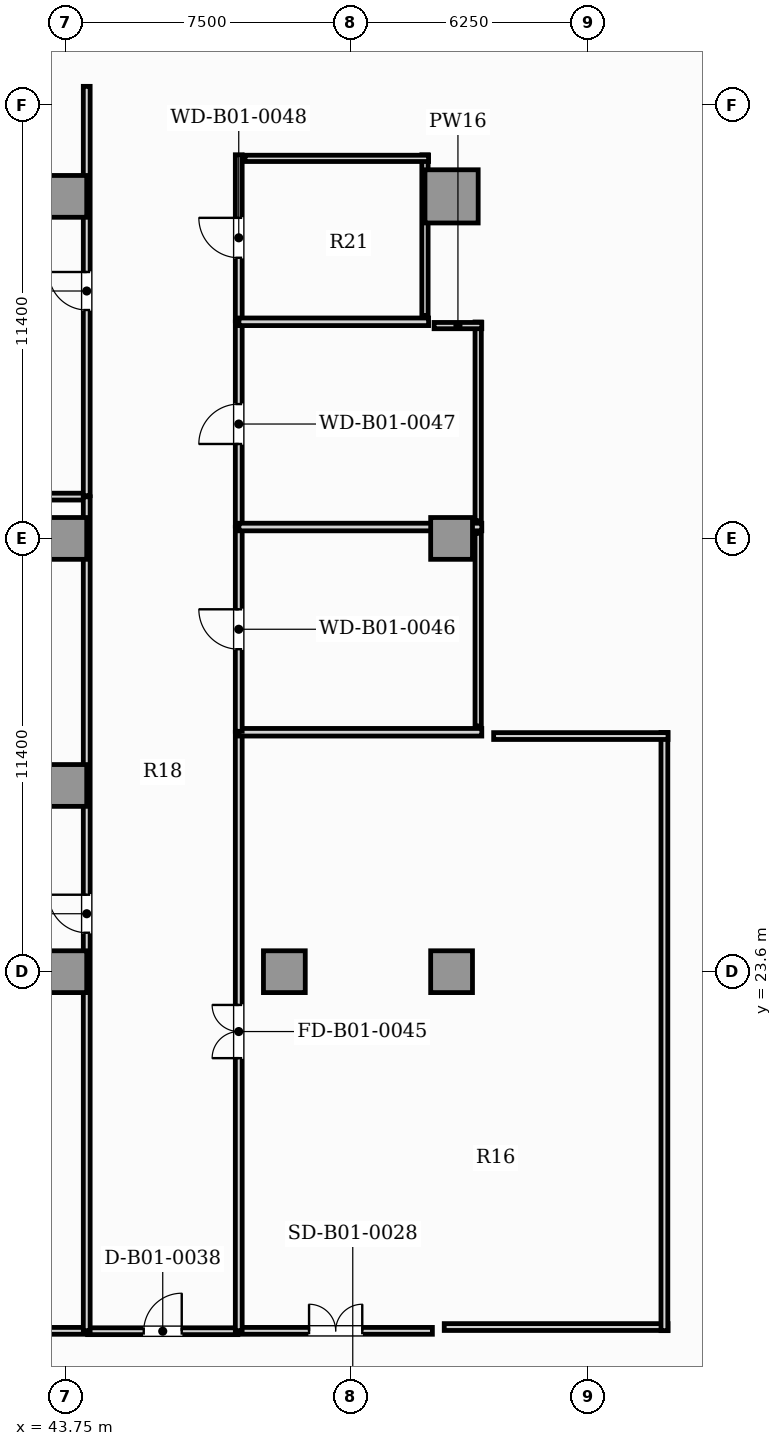
"""IFC4 building model, lengths in metres.
Left out: names, types, materials, properties, quantities, classifications, styles, units other than length and angle.
Written with IfcOpenShell. Run it as: python <this file> out.ifc"""

import sys

from ifc_helpers import new_model, si_unit, direction, frame, frame_2d, origin, origin_2d, place, context, subcontext, project, spatial, rectangle, hollow_rectangle, extrude, element, fill, save


model = new_model("IFC4")
c1 = context("Model", 3, precision=1e-05, world=origin(), true_north=direction((0.0, 1.0)))
c2 = subcontext(c1, "Body", "Model", "MODEL_VIEW")
j1 = project(units=[si_unit("LENGTHUNIT", "METRE"), si_unit("PLANEANGLEUNIT", "RADIAN")], contexts=[c1])
p1 = place(None, origin())
s1 = spatial("IfcSite", under=j1, at=p1, CompositionType="ELEMENT")
p2 = place(p1, origin())
s2 = spatial("IfcBuilding", under=s1, at=p2, CompositionType="ELEMENT")
p3 = place(p2, frame((0.0, 0.0, -5.4)))
s3 = spatial("IfcBuildingStorey", under=s2, at=p3, CompositionType="ELEMENT", Elevation=-5.4)
p4 = place(p3, frame((53.9, 44.0, 0.0), z_axis=(0.0, 0.0, 1.0), x_axis=(1.0, 0.0, 0.0)))
e1 = element("IfcColumn", 1, at=p4, inside=s3, PredefinedType="USERDEFINED", context=c2, shape_type="SweptSolid", body=[
    extrude(hollow_rectangle(XDim=1.4, YDim=1.4, WallThickness=0.08, at=origin_2d()), origin(), (0.0, 0.0, 1.0), 5.4),
])
for number, where, z_axis, x_axis in (
    (2, (43.75, 23.6, 0.0), (0.0, 0.0, 1.0), (1.0, 0.0, 0.0)),
    (3, (43.75, 35.0, 0.0), (0.0, 0.0, 1.0), (1.0, 0.0, 0.0)),
    (4, (43.75, 44.0, 0.0), (0.0, 0.0, 1.0), (1.0, 0.0, 0.0)),
    (5, (53.9, 23.6, 0.0), (0.0, 0.0, 1.0), (1.0, 0.0, 0.0)),
    (6, (53.9, 35.0, 0.0), (0.0, 0.0, 1.0), (1.0, 0.0, 0.0)),
    (7, (49.5, 23.6, 0.0), (0.0, 0.0, 1.0), (1.0, 0.0, 0.0)),
    (8, (43.75, 28.5, 0.0), (0.0, 0.0, 1.0), (1.0, 0.0, 0.0)),
):
    element("IfcColumn", number, at=place(p3, frame(where, z_axis=z_axis, x_axis=x_axis)), inside=s3, PredefinedType="COLUMN", context=c2, shape_type="SweptSolid", body=[
        extrude(rectangle(XDim=1.1, YDim=1.1, at=origin_2d()), origin(), (0.0, 0.0, 1.0), 5.4),
    ])
p5 = place(p3, frame((13.205, 14.15, 0.0), z_axis=(0.0, 0.0, 1.0), x_axis=(1.0, 0.0, 0.0)))
e9 = element("IfcWall", 9, at=p5, inside=s3, PredefinedType="PARTITIONING", context=c2, shape_type="SweptSolid", body=[
    extrude(rectangle(XDim=31.09, YDim=0.18, at=frame_2d((15.545, 0.0))), origin(), (0.0, 0.0, 1.0), 5.05),
])
p6 = place(p5, frame((15.045, 0.0, 0.0)))
e10 = element("IfcOpeningElement", 10, at=p6, cuts=e9, PredefinedType="OPENING", context=c2, shape_type="SweptSolid", body=[
    extrude(rectangle(XDim=1.0, YDim=2.15, at=frame_2d((0.5, 1.075))), frame((0.0, 0.1, 0.0), z_axis=(0.0, -1.0, 0.0), x_axis=(1.0, 0.0, 0.0)), (0.0, 0.0, 1.0), 0.2),
])
p7 = place(p3, frame((48.305, 14.15, 0.0), z_axis=(0.0, 0.0, 1.0), x_axis=(1.0, 0.0, 0.0)))
e11 = element("IfcWall", 11, at=p7, inside=s3, PredefinedType="PARTITIONING", context=c2, shape_type="SweptSolid", body=[
    extrude(rectangle(XDim=5.09, YDim=0.18, at=frame_2d((2.545, 0.0))), origin(), (0.0, 0.0, 1.0), 5.05),
])
p8 = place(p7, frame((1.845, 0.0, 0.0)))
e12 = element("IfcOpeningElement", 12, at=p8, cuts=e11, PredefinedType="OPENING", context=c2, shape_type="SweptSolid", body=[
    extrude(rectangle(XDim=1.4, YDim=2.2, at=frame_2d((0.7, 1.1))), frame((0.0, 0.1, 0.0), z_axis=(0.0, -1.0, 0.0), x_axis=(1.0, 0.0, 0.0)), (0.0, 0.0, 1.0), 0.2),
])
p9 = place(p3, frame((44.323, 14.14, 0.0), z_axis=(0.0, 0.0, 1.0), x_axis=(1.0, 0.0, 0.0)))
e13 = element("IfcWall", 13, at=p9, inside=s3, PredefinedType="PARTITIONING", context=c2, shape_type="SweptSolid", body=[
    extrude(rectangle(XDim=3.954, YDim=0.18, at=frame_2d((1.977, 0.0))), origin(), (0.0, 0.0, 1.0), 5.05),
])
p10 = place(p9, frame((1.477, 0.0, 0.0)))
e14 = element("IfcOpeningElement", 14, at=p10, cuts=e13, PredefinedType="OPENING", context=c2, shape_type="SweptSolid", body=[
    extrude(rectangle(XDim=1.0, YDim=2.15, at=frame_2d((0.5, 1.075))), frame((0.0, 0.1, 0.0), z_axis=(0.0, -1.0, 0.0), x_axis=(1.0, 0.0, 0.0)), (0.0, 0.0, 1.0), 0.2),
])
p11 = place(p3, frame((13.205, 36.1, 0.0), z_axis=(0.0, 0.0, 1.0), x_axis=(1.0, 0.0, 0.0)))
e15 = element("IfcWall", 15, at=p11, inside=s3, PredefinedType="PARTITIONING", context=c2, shape_type="SweptSolid", body=[
    extrude(rectangle(XDim=31.09, YDim=0.18, at=frame_2d((15.545, 0.0))), origin(), (0.0, 0.0, 1.0), 5.05),
])
p12 = place(p11, frame((10.382, 0.0, 0.0)))
e16 = element("IfcOpeningElement", 16, at=p12, cuts=e15, PredefinedType="OPENING", context=c2, shape_type="SweptSolid", body=[
    extrude(rectangle(XDim=1.0, YDim=2.15, at=frame_2d((0.5, 1.075))), frame((0.0, 0.1, 0.0), z_axis=(0.0, -1.0, 0.0), x_axis=(1.0, 0.0, 0.0)), (0.0, 0.0, 1.0), 0.2),
])
p13 = place(p3, frame((44.3, 14.155, 0.0), z_axis=(0.0, 0.0, 1.0), x_axis=(0.0, 1.0, 0.0)))
e17 = element("IfcWall", 17, at=p13, inside=s3, PredefinedType="PARTITIONING", context=c2, shape_type="SweptSolid", body=[
    extrude(rectangle(XDim=21.94, YDim=0.18, at=frame_2d((10.97, 0.0))), origin(), (0.0, 0.0, 1.0), 5.05),
])
p14 = place(p13, frame((10.47, 0.0, 0.0)))
e18 = element("IfcOpeningElement", 18, at=p14, cuts=e17, PredefinedType="OPENING", context=c2, shape_type="SweptSolid", body=[
    extrude(rectangle(XDim=1.0, YDim=2.15, at=frame_2d((0.5, 1.075))), frame((0.0, 0.1, 0.0), z_axis=(0.0, -1.0, 0.0), x_axis=(1.0, 0.0, 0.0)), (0.0, 0.0, 1.0), 0.2),
])
p15 = place(p3, frame((44.3, 36.125, 0.0), z_axis=(0.0, 0.0, 1.0), x_axis=(0.0, 1.0, 0.0)))
e19 = element("IfcWall", 19, at=p15, inside=s3, PredefinedType="PARTITIONING", context=c2, shape_type="SweptSolid", body=[
    extrude(rectangle(XDim=10.77, YDim=0.18, at=frame_2d((5.385, 0.0))), origin(), (0.0, 0.0, 1.0), 5.05),
])
p16 = place(p15, frame((4.885, 0.0, 0.0)))
e20 = element("IfcOpeningElement", 20, at=p16, cuts=e19, PredefinedType="OPENING", context=c2, shape_type="SweptSolid", body=[
    extrude(rectangle(XDim=1.0, YDim=2.15, at=frame_2d((0.5, 1.075))), frame((0.0, 0.1, 0.0), z_axis=(0.0, -1.0, 0.0), x_axis=(1.0, 0.0, 0.0)), (0.0, 0.0, 1.0), 0.2),
])
p17 = place(p3, frame((48.3, 14.155, 0.0), z_axis=(0.0, 0.0, 1.0), x_axis=(0.0, 1.0, 0.0)))
e21 = element("IfcWall", 21, at=p17, inside=s3, PredefinedType="PARTITIONING", context=c2, shape_type="SweptSolid", body=[
    extrude(rectangle(XDim=15.74, YDim=0.18, at=frame_2d((7.87, 0.0))), origin(), (0.0, 0.0, 1.0), 5.05),
])
p18 = place(p17, frame((7.17, 0.0, 0.0)))
e22 = element("IfcOpeningElement", 22, at=p18, cuts=e21, PredefinedType="OPENING", context=c2, shape_type="SweptSolid", body=[
    extrude(rectangle(XDim=1.4, YDim=2.2, at=frame_2d((0.7, 1.1))), frame((0.0, 0.1, 0.0), z_axis=(0.0, -1.0, 0.0), x_axis=(1.0, 0.0, 0.0)), (0.0, 0.0, 1.0), 0.2),
])
p19 = place(p3, frame((48.305, 29.9, 0.0), z_axis=(0.0, 0.0, 1.0), x_axis=(1.0, 0.0, 0.0)))
e23 = element("IfcWall", 23, at=p19, inside=s3, PredefinedType="PARTITIONING", context=c2, shape_type="SweptSolid", body=[
    extrude(rectangle(XDim=6.39, YDim=0.2, at=frame_2d((3.195, 0.0))), origin(), (0.0, 0.0, 1.0), 5.05),
])
p20 = place(p3, frame((48.3, 29.925, 0.0), z_axis=(0.0, 0.0, 1.0), x_axis=(0.0, 1.0, 0.0)))
e24 = element("IfcWall", 24, at=p20, inside=s3, PredefinedType="PARTITIONING", context=c2, shape_type="SweptSolid", body=[
    extrude(rectangle(XDim=5.37, YDim=0.18, at=frame_2d((2.685, 0.0))), origin(), (0.0, 0.0, 1.0), 5.05),
])
p21 = place(p20, frame((2.16, 0.0, 0.0)))
e25 = element("IfcOpeningElement", 25, at=p21, cuts=e24, PredefinedType="OPENING", context=c2, shape_type="SweptSolid", body=[
    extrude(rectangle(XDim=1.05, YDim=2.15, at=frame_2d((0.525, 1.075))), frame((0.0, 0.1, 0.0), z_axis=(0.0, -1.0, 0.0), x_axis=(1.0, 0.0, 0.0)), (0.0, 0.0, 1.0), 0.2),
])
p22 = place(p3, frame((48.3, 35.325, 0.0), z_axis=(0.0, 0.0, 1.0), x_axis=(0.0, 1.0, 0.0)))
e26 = element("IfcWall", 26, at=p22, inside=s3, PredefinedType="PARTITIONING", context=c2, shape_type="SweptSolid", body=[
    extrude(rectangle(XDim=5.37, YDim=0.18, at=frame_2d((2.685, 0.0))), origin(), (0.0, 0.0, 1.0), 5.05),
])
p23 = place(p22, frame((2.16, 0.0, 0.0)))
e27 = element("IfcOpeningElement", 27, at=p23, cuts=e26, PredefinedType="OPENING", context=c2, shape_type="SweptSolid", body=[
    extrude(rectangle(XDim=1.05, YDim=2.15, at=frame_2d((0.525, 1.075))), frame((0.0, 0.1, 0.0), z_axis=(0.0, -1.0, 0.0), x_axis=(1.0, 0.0, 0.0)), (0.0, 0.0, 1.0), 0.2),
])
p24 = place(p3, frame((48.3, 40.725, 0.0), z_axis=(0.0, 0.0, 1.0), x_axis=(0.0, 1.0, 0.0)))
e28 = element("IfcWall", 28, at=p24, inside=s3, PredefinedType="PARTITIONING", context=c2, shape_type="SweptSolid", body=[
    extrude(rectangle(XDim=4.37, YDim=0.18, at=frame_2d((2.185, 0.0))), origin(), (0.0, 0.0, 1.0), 5.05),
])
p25 = place(p24, frame((1.66, 0.0, 0.0)))
e29 = element("IfcOpeningElement", 29, at=p25, cuts=e28, PredefinedType="OPENING", context=c2, shape_type="SweptSolid", body=[
    extrude(rectangle(XDim=1.05, YDim=2.15, at=frame_2d((0.525, 1.075))), frame((0.0, 0.1, 0.0), z_axis=(0.0, -1.0, 0.0), x_axis=(1.0, 0.0, 0.0)), (0.0, 0.0, 1.0), 0.2),
])
p26 = place(p3, frame((48.305, 35.3, 0.0), z_axis=(0.0, 0.0, 1.0), x_axis=(1.0, 0.0, 0.0)))
e30 = element("IfcWall", 30, at=p26, inside=s3, PredefinedType="PARTITIONING", context=c2, shape_type="SweptSolid", body=[
    extrude(rectangle(XDim=6.39, YDim=0.2, at=frame_2d((3.195, 0.0))), origin(), (0.0, 0.0, 1.0), 4.15),
])
p27 = place(p3, frame((48.305, 40.7, 0.0), z_axis=(0.0, 0.0, 1.0), x_axis=(1.0, 0.0, 0.0)))
e31 = element("IfcWall", 31, at=p27, inside=s3, PredefinedType="PARTITIONING", context=c2, shape_type="SweptSolid", body=[
    extrude(rectangle(XDim=4.99, YDim=0.2, at=frame_2d((2.495, 0.0))), origin(), (0.0, 0.0, 1.0), 5.05),
])
p28 = place(p3, frame((53.708, 14.25, 0.0), z_axis=(0.0, 0.0, 1.0), x_axis=(1.0, 0.0, 0.0)))
e32 = element("IfcWall", 32, at=p28, inside=s3, PredefinedType="PARTITIONING", context=c2, shape_type="SweptSolid", body=[
    extrude(rectangle(XDim=5.887, YDim=0.18, at=frame_2d((2.944, 0.0))), origin(), (0.0, 0.0, 1.0), 5.05),
])
p29 = place(p3, frame((59.5, 14.155, 0.0), z_axis=(0.0, 0.0, 1.0), x_axis=(0.0, 1.0, 0.0)))
e33 = element("IfcWall", 33, at=p29, inside=s3, PredefinedType="PARTITIONING", context=c2, shape_type="SweptSolid", body=[
    extrude(rectangle(XDim=15.74, YDim=0.18, at=frame_2d((7.87, 0.0))), origin(), (0.0, 0.0, 1.0), 5.05),
])
p30 = place(p3, frame((59.595, 29.8, 0.0), z_axis=(0.0, 0.0, 1.0), x_axis=(-1.0, 0.0, 0.0)))
e34 = element("IfcWall", 34, at=p30, inside=s3, PredefinedType="PARTITIONING", context=c2, shape_type="SweptSolid", body=[
    extrude(rectangle(XDim=4.588, YDim=0.18, at=frame_2d((2.294, 0.0))), origin(), (0.0, 0.0, 1.0), 5.05),
])
p31 = place(p3, frame((54.6, 30.065, 0.0), z_axis=(0.0, 0.0, 1.0), x_axis=(0.0, 1.0, 0.0)))
e35 = element("IfcWall", 35, at=p31, inside=s3, PredefinedType="PLUMBINGWALL", context=c2, shape_type="SweptSolid", body=[
    extrude(rectangle(XDim=5.07, YDim=0.165, at=frame_2d((2.535, 0.0))), origin(), (0.0, 0.0, 1.0), 5.05),
])
p32 = place(p3, frame((54.6, 35.465, 0.0), z_axis=(0.0, 0.0, 1.0), x_axis=(0.0, 1.0, 0.0)))
e36 = element("IfcWall", 36, at=p32, inside=s3, PredefinedType="PLUMBINGWALL", context=c2, shape_type="SweptSolid", body=[
    extrude(rectangle(XDim=5.23, YDim=0.165, at=frame_2d((2.615, 0.0))), origin(), (0.0, 0.0, 1.0), 5.05),
])
p33 = place(p3, frame((54.695, 40.6, 0.0), z_axis=(0.0, 0.0, 1.0), x_axis=(-1.0, 0.0, 0.0)))
e37 = element("IfcWall", 37, at=p33, inside=s3, PredefinedType="PLUMBINGWALL", context=c2, shape_type="SweptSolid", body=[
    extrude(rectangle(XDim=1.255, YDim=0.165, at=frame_2d((0.627, 0.0))), origin(), (0.0, 0.0, 1.0), 5.05),
])
p34 = place(p3, frame((53.2, 40.865, 0.0), z_axis=(0.0, 0.0, 1.0), x_axis=(0.0, 1.0, 0.0)))
e38 = element("IfcWall", 38, at=p34, inside=s3, PredefinedType="PLUMBINGWALL", context=c2, shape_type="SweptSolid", body=[
    extrude(rectangle(XDim=4.23, YDim=0.165, at=frame_2d((2.115, 0.0))), origin(), (0.0, 0.0, 1.0), 5.05),
])
p35 = place(p3, frame((53.295, 45.0, 0.0), z_axis=(0.0, 0.0, 1.0), x_axis=(-1.0, 0.0, 0.0)))
e39 = element("IfcWall", 39, at=p35, inside=s3, PredefinedType="PLUMBINGWALL", context=c2, shape_type="SweptSolid", body=[
    extrude(rectangle(XDim=4.83, YDim=0.165, at=frame_2d((2.415, 0.0))), origin(), (0.0, 0.0, 1.0), 5.05),
])
p36 = place(p8, origin())
e40 = element("IfcDoor", 40, at=p36, inside=s3, OperationType="DOUBLE_DOOR_SINGLE_SWING", PredefinedType="DOOR", context=c2, shape_type="SweptSolid", body=[
    extrude(rectangle(XDim=1.4, YDim=2.2, at=frame_2d((0.7, 1.1))), frame((0.0, 0.025, 0.0), z_axis=(0.0, -1.0, 0.0), x_axis=(1.0, 0.0, 0.0)), (0.0, 0.0, 1.0), 0.05),
])
fill(e12, e40)
p37 = place(p10, origin())
e41 = element("IfcDoor", 41, at=p37, inside=s3, OperationType="SINGLE_SWING_RIGHT", PredefinedType="DOOR", context=c2, shape_type="SweptSolid", body=[
    extrude(rectangle(XDim=1.0, YDim=2.15, at=frame_2d((0.5, 1.075))), frame((0.0, 0.025, 0.0), z_axis=(0.0, -1.0, 0.0), x_axis=(1.0, 0.0, 0.0)), (0.0, 0.0, 1.0), 0.05),
])
fill(e14, e41)
p38 = place(p14, origin())
e42 = element("IfcDoor", 42, at=p38, inside=s3, OperationType="SINGLE_SWING_RIGHT", PredefinedType="DOOR", context=c2, shape_type="SweptSolid", body=[
    extrude(rectangle(XDim=1.0, YDim=2.15, at=frame_2d((0.5, 1.075))), frame((0.0, 0.025, 0.0), z_axis=(0.0, -1.0, 0.0), x_axis=(1.0, 0.0, 0.0)), (0.0, 0.0, 1.0), 0.05),
])
fill(e18, e42)
p39 = place(p16, origin())
e43 = element("IfcDoor", 43, at=p39, inside=s3, OperationType="SINGLE_SWING_RIGHT", PredefinedType="DOOR", context=c2, shape_type="SweptSolid", body=[
    extrude(rectangle(XDim=1.0, YDim=2.15, at=frame_2d((0.5, 1.075))), frame((0.0, 0.025, 0.0), z_axis=(0.0, -1.0, 0.0), x_axis=(1.0, 0.0, 0.0)), (0.0, 0.0, 1.0), 0.05),
])
fill(e20, e43)
p40 = place(p18, origin())
e44 = element("IfcDoor", 44, at=p40, inside=s3, OperationType="DOUBLE_DOOR_SINGLE_SWING", PredefinedType="DOOR", context=c2, shape_type="SweptSolid", body=[
    extrude(rectangle(XDim=1.4, YDim=2.2, at=frame_2d((0.7, 1.1))), frame((0.0, 0.025, 0.0), z_axis=(0.0, -1.0, 0.0), x_axis=(1.0, 0.0, 0.0)), (0.0, 0.0, 1.0), 0.05),
])
fill(e22, e44)
p41 = place(p21, origin())
e45 = element("IfcDoor", 45, at=p41, inside=s3, OperationType="SINGLE_SWING_RIGHT", PredefinedType="DOOR", context=c2, shape_type="SweptSolid", body=[
    extrude(rectangle(XDim=1.05, YDim=2.15, at=frame_2d((0.525, 1.075))), frame((0.0, 0.025, 0.0), z_axis=(0.0, -1.0, 0.0), x_axis=(1.0, 0.0, 0.0)), (0.0, 0.0, 1.0), 0.05),
])
fill(e25, e45)
p42 = place(p23, origin())
e46 = element("IfcDoor", 46, at=p42, inside=s3, OperationType="SINGLE_SWING_LEFT", PredefinedType="DOOR", context=c2, shape_type="SweptSolid", body=[
    extrude(rectangle(XDim=1.05, YDim=2.15, at=frame_2d((0.525, 1.075))), frame((0.0, 0.025, 0.0), z_axis=(0.0, -1.0, 0.0), x_axis=(1.0, 0.0, 0.0)), (0.0, 0.0, 1.0), 0.05),
])
fill(e27, e46)
p43 = place(p25, origin())
e47 = element("IfcDoor", 47, at=p43, inside=s3, OperationType="SINGLE_SWING_RIGHT", PredefinedType="DOOR", context=c2, shape_type="SweptSolid", body=[
    extrude(rectangle(XDim=1.05, YDim=2.15, at=frame_2d((0.525, 1.075))), frame((0.0, 0.025, 0.0), z_axis=(0.0, -1.0, 0.0), x_axis=(1.0, 0.0, 0.0)), (0.0, 0.0, 1.0), 0.05),
])
fill(e29, e47)
save(model, sys.argv[1])
